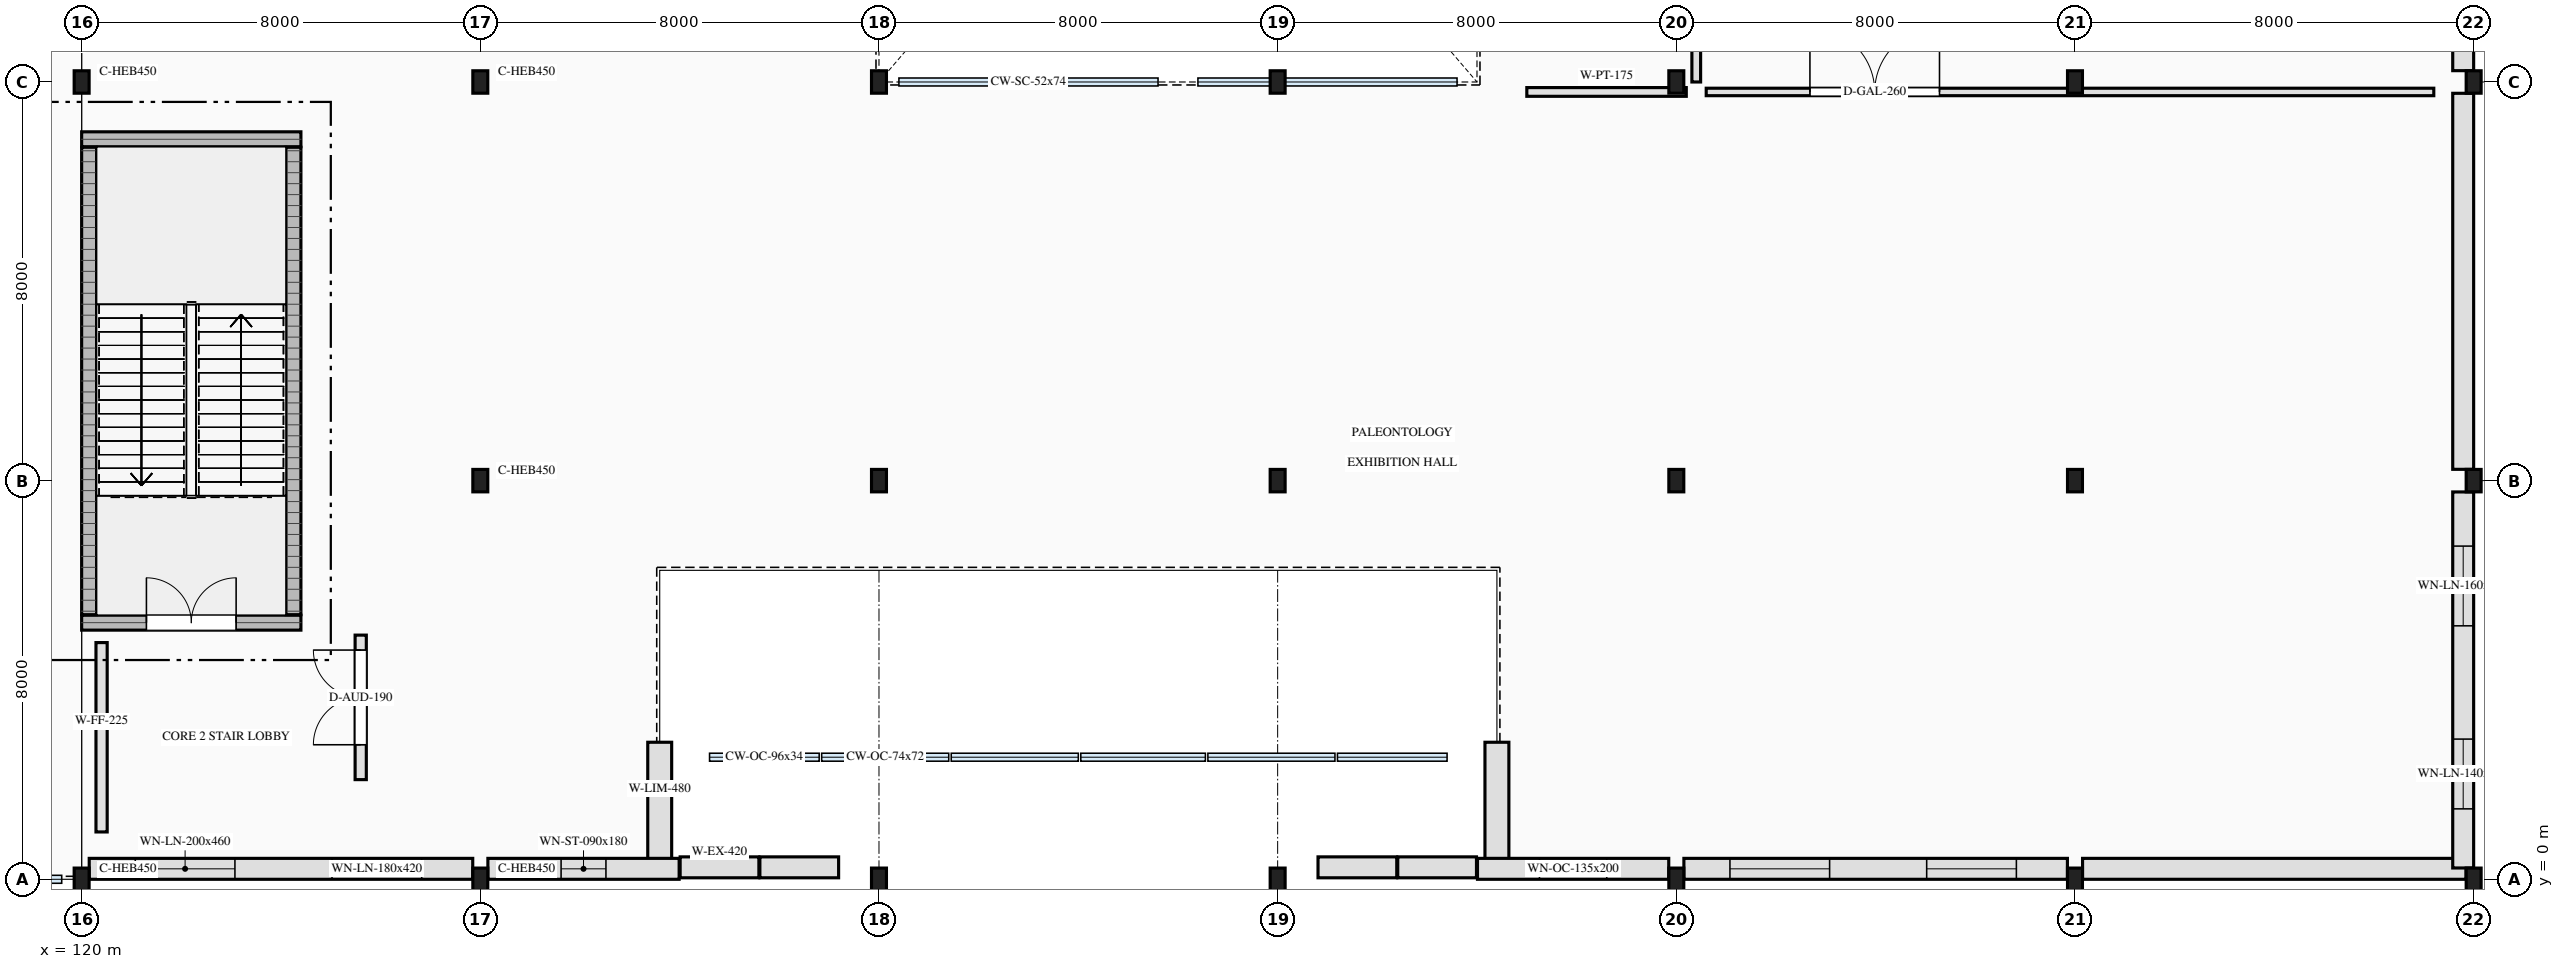
"""IFC4 building model, lengths in metres.
Left out: names, types, materials, properties, quantities, classifications, styles, units other than length and angle.
Written with IfcOpenShell. Run it as: python <this file> out.ifc"""

import sys

from ifc_helpers import new_model, si_unit, direction, frame, frame_2d, origin, origin_2d, place, context, subcontext, project, spatial, rectangle, i_section, extrude, element, fill, save


model = new_model("IFC4")
c1 = context("Model", 3, precision=1e-05, world=origin(), true_north=direction((0.0, 1.0)))
c2 = subcontext(c1, "Body", "Model", "MODEL_VIEW")
j1 = project(units=[si_unit("LENGTHUNIT", "METRE"), si_unit("PLANEANGLEUNIT", "RADIAN")], contexts=[c1])
p1 = place(None, origin())
s1 = spatial("IfcSite", under=j1, at=p1, CompositionType="ELEMENT")
p2 = place(p1, origin())
s2 = spatial("IfcBuilding", under=s1, at=p2, CompositionType="ELEMENT")
p3 = place(p2, frame((0.0, 0.0, 9.6)))
s3 = spatial("IfcBuildingStorey", under=s2, at=p3, CompositionType="ELEMENT", Elevation=9.6)
p4 = place(p3, frame((120.0, 5.15, 0.0), z_axis=(0.0, 0.0, 1.0), x_axis=(1.0, 0.0, 0.0)))
e1 = element("IfcWall", 1, at=p4, inside=s3, PredefinedType="SHEAR", context=c2, shape_type="SweptSolid", body=[
    extrude(rectangle(XDim=4.4, YDim=0.3, at=frame_2d((2.2, 0.0))), origin(), (0.0, 0.0, 1.0), 8.0),
])
p5 = place(p4, frame((1.3, 0.0, 0.0)))
e2 = element("IfcOpeningElement", 2, at=p5, cuts=e1, PredefinedType="OPENING", context=c2, shape_type="SweptSolid", body=[
    extrude(rectangle(XDim=1.8, YDim=2.2, at=frame_2d((0.9, 1.1))), frame((0.0, 0.16, 0.0), z_axis=(0.0, -1.0, 0.0), x_axis=(1.0, 0.0, 0.0)), (0.0, 0.0, 1.0), 0.32),
])
p6 = place(p3, frame((120.0, 14.85, 0.0), z_axis=(0.0, 0.0, 1.0), x_axis=(1.0, 0.0, 0.0)))
e3 = element("IfcWall", 3, at=p6, inside=s3, PredefinedType="SHEAR", context=c2, shape_type="SweptSolid", body=[
    extrude(rectangle(XDim=4.4, YDim=0.3, at=frame_2d((2.2, 0.0))), origin(), (0.0, 0.0, 1.0), 8.0),
])
for number, where, z_axis, x_axis in (
    (4, (120.15, 5.31, 0.0), (0.0, 0.0, 1.0), (0.0, 1.0, 0.0)),
    (5, (124.25, 5.31, 0.0), (0.0, 0.0, 1.0), (0.0, 1.0, 0.0)),
):
    element("IfcWall", number, at=place(p3, frame(where, z_axis=z_axis, x_axis=x_axis)), inside=s3, PredefinedType="SHEAR", context=c2, shape_type="SweptSolid", body=[
        extrude(rectangle(XDim=9.38, YDim=0.3, at=frame_2d((4.69, 0.0))), origin(), (0.0, 0.0, 1.0), 8.0),
    ])
for number, where, z_axis, x_axis in (
    (6, (120.0, 0.0, 0.0), (0.0, 0.0, 1.0), (1.0, 0.0, 0.0)),
    (7, (120.0, 16.0, 0.0), (0.0, 0.0, 1.0), (1.0, 0.0, 0.0)),
    (8, (128.0, 0.0, 0.0), (0.0, 0.0, 1.0), (1.0, 0.0, 0.0)),
    (9, (128.0, 8.0, 0.0), (0.0, 0.0, 1.0), (1.0, 0.0, 0.0)),
    (10, (128.0, 16.0, 0.0), (0.0, 0.0, 1.0), (1.0, 0.0, 0.0)),
    (11, (136.0, 0.0, 0.0), (0.0, 0.0, 1.0), (1.0, 0.0, 0.0)),
    (12, (136.0, 8.0, 0.0), (0.0, 0.0, 1.0), (1.0, 0.0, 0.0)),
    (13, (136.0, 16.0, 0.0), (0.0, 0.0, 1.0), (1.0, 0.0, 0.0)),
    (14, (144.0, 0.0, 0.0), (0.0, 0.0, 1.0), (1.0, 0.0, 0.0)),
    (15, (144.0, 8.0, 0.0), (0.0, 0.0, 1.0), (1.0, 0.0, 0.0)),
    (16, (144.0, 16.0, 0.0), (0.0, 0.0, 1.0), (1.0, 0.0, 0.0)),
    (17, (152.0, 0.0, 0.0), (0.0, 0.0, 1.0), (1.0, 0.0, 0.0)),
    (18, (152.0, 8.0, 0.0), (0.0, 0.0, 1.0), (1.0, 0.0, 0.0)),
    (19, (152.0, 16.0, 0.0), (0.0, 0.0, 1.0), (1.0, 0.0, 0.0)),
    (20, (160.0, 0.0, 0.0), (0.0, 0.0, 1.0), (1.0, 0.0, 0.0)),
    (21, (160.0, 8.0, 0.0), (0.0, 0.0, 1.0), (1.0, 0.0, 0.0)),
    (22, (160.0, 16.0, 0.0), (0.0, 0.0, 1.0), (1.0, 0.0, 0.0)),
    (23, (168.0, 0.0, 0.0), (0.0, 0.0, 1.0), (1.0, 0.0, 0.0)),
    (24, (168.0, 8.0, 0.0), (0.0, 0.0, 1.0), (1.0, 0.0, 0.0)),
    (25, (168.0, 16.0, 0.0), (0.0, 0.0, 1.0), (1.0, 0.0, 0.0)),
):
    element("IfcColumn", number, at=place(p3, frame(where, z_axis=z_axis, x_axis=x_axis)), inside=s3, PredefinedType="COLUMN", context=c2, shape_type="SweptSolid", body=[
        extrude(i_section(OverallWidth=0.3, OverallDepth=0.45, WebThickness=0.014, FlangeThickness=0.026, FilletRadius=0.027, at=origin_2d()), origin(), (0.0, 0.0, 1.0), 8.0),
    ])
p7 = place(p3, frame((133.59, 0.24, 0.0), z_axis=(0.0, 0.0, 1.0), x_axis=(-1.0, 0.0, 0.0)))
e26 = element("IfcWall", 26, at=p7, inside=s3, PredefinedType="SOLIDWALL", context=c2, shape_type="SweptSolid", body=[
    extrude(rectangle(XDim=1.58, YDim=0.42, at=frame_2d((0.79, 0.0))), origin(), (0.0, 0.0, 1.0), 2.772),
])
for number, where, z_axis, x_axis in (
    (27, (135.19, 0.24, 0.0), (0.0, 0.0, 1.0), (-1.0, 0.0, 0.0)),
    (28, (146.39, 0.24, 0.0), (0.0, 0.0, 1.0), (-1.0, 0.0, 0.0)),
):
    element("IfcWall", number, at=place(p3, frame(where, z_axis=z_axis, x_axis=x_axis)), inside=s3, PredefinedType="SOLIDWALL", context=c2, shape_type="SweptSolid", body=[
        extrude(rectangle(XDim=1.58, YDim=0.42, at=frame_2d((0.79, 0.0))), origin(), (0.0, 0.0, 1.0), 0.399),
    ])
p8 = place(p3, frame((147.99, 0.24, 0.0), z_axis=(0.0, 0.0, 1.0), x_axis=(-1.0, 0.0, 0.0)))
e29 = element("IfcWall", 29, at=p8, inside=s3, PredefinedType="SOLIDWALL", context=c2, shape_type="SweptSolid", body=[
    extrude(rectangle(XDim=1.58, YDim=0.42, at=frame_2d((0.79, 0.0))), origin(), (0.0, 0.0, 1.0), 2.772),
])
for number, where, z_axis, x_axis in (
    (30, (131.6, 0.24, 0.0), (0.0, 0.0, 1.0), (0.0, 1.0, 0.0)),
    (31, (148.4, 0.24, 0.0), (0.0, 0.0, 1.0), (0.0, 1.0, 0.0)),
):
    element("IfcWall", number, at=place(p3, frame(where, z_axis=z_axis, x_axis=x_axis)), inside=s3, PredefinedType="SOLIDWALL", context=c2, shape_type="SweptSolid", body=[
        extrude(rectangle(XDim=2.51, YDim=0.48, at=frame_2d((1.255, 0.0))), origin(), (0.0, 0.0, 1.0), 7.72),
    ])
p9 = place(p3, frame((127.848, 0.21, 0.0), z_axis=(0.0, 0.0, 1.0), x_axis=(-1.0, 0.0, 0.0)))
e32 = element("IfcWall", 32, at=p9, inside=s3, PredefinedType="SOLIDWALL", context=c2, shape_type="SweptSolid", body=[
    extrude(rectangle(XDim=7.696, YDim=0.42, at=frame_2d((3.848, 0.0))), origin(), (0.0, 0.0, 1.0), 7.285),
])
p10 = place(p9, frame((1.024, 0.0, 0.85)))
e33 = element("IfcOpeningElement", 33, at=p10, cuts=e32, PredefinedType="OPENING", context=c2, shape_type="SweptSolid", body=[
    extrude(rectangle(XDim=1.8, YDim=4.2, at=frame_2d((0.9, 2.1))), frame((0.0, 0.22, 0.0), z_axis=(0.0, -1.0, 0.0), x_axis=(1.0, 0.0, 0.0)), (0.0, 0.0, 1.0), 0.44),
])
p11 = place(p9, frame((4.772, 0.0, 0.85)))
e34 = element("IfcOpeningElement", 34, at=p11, cuts=e32, PredefinedType="OPENING", context=c2, shape_type="SweptSolid", body=[
    extrude(rectangle(XDim=2.0, YDim=4.6, at=frame_2d((1.0, 2.3))), frame((0.0, 0.22, 0.0), z_axis=(0.0, -1.0, 0.0), x_axis=(1.0, 0.0, 0.0)), (0.0, 0.0, 1.0), 0.44),
])
p12 = place(p3, frame((131.99, 0.21, 0.0), z_axis=(0.0, 0.0, 1.0), x_axis=(-1.0, 0.0, 0.0)))
e35 = element("IfcWall", 35, at=p12, inside=s3, PredefinedType="SOLIDWALL", context=c2, shape_type="SweptSolid", body=[
    extrude(rectangle(XDim=3.838, YDim=0.42, at=frame_2d((1.919, 0.0))), origin(), (0.0, 0.0, 1.0), 7.76),
])
p13 = place(p12, frame((1.469, 0.0, 0.85)))
e36 = element("IfcOpeningElement", 36, at=p13, cuts=e35, PredefinedType="OPENING", context=c2, shape_type="SweptSolid", body=[
    extrude(rectangle(XDim=0.9, YDim=1.8, at=frame_2d((0.45, 0.9))), frame((0.0, 0.22, 0.0), z_axis=(0.0, -1.0, 0.0), x_axis=(1.0, 0.0, 0.0)), (0.0, 0.0, 1.0), 0.44),
])
p14 = place(p3, frame((159.848, 0.21, 0.0), z_axis=(0.0, 0.0, 1.0), x_axis=(-1.0, 0.0, 0.0)))
e37 = element("IfcWall", 37, at=p14, inside=s3, PredefinedType="SOLIDWALL", context=c2, shape_type="SweptSolid", body=[
    extrude(rectangle(XDim=7.696, YDim=0.42, at=frame_2d((3.848, 0.0))), origin(), (0.0, 0.0, 1.0), 7.305),
])
p15 = place(p14, frame((1.024, 0.0, 0.85)))
e38 = element("IfcOpeningElement", 38, at=p15, cuts=e37, PredefinedType="OPENING", context=c2, shape_type="SweptSolid", body=[
    extrude(rectangle(XDim=1.8, YDim=4.2, at=frame_2d((0.9, 2.1))), frame((0.0, 0.22, 0.0), z_axis=(0.0, -1.0, 0.0), x_axis=(1.0, 0.0, 0.0)), (0.0, 0.0, 1.0), 0.44),
])
p16 = place(p14, frame((4.772, 0.0, 0.85)))
e39 = element("IfcOpeningElement", 39, at=p16, cuts=e37, PredefinedType="OPENING", context=c2, shape_type="SweptSolid", body=[
    extrude(rectangle(XDim=2.0, YDim=4.6, at=frame_2d((1.0, 2.3))), frame((0.0, 0.22, 0.0), z_axis=(0.0, -1.0, 0.0), x_axis=(1.0, 0.0, 0.0)), (0.0, 0.0, 1.0), 0.44),
])
p17 = place(p3, frame((167.848, 0.21, 0.0), z_axis=(0.0, 0.0, 1.0), x_axis=(-1.0, 0.0, 0.0)))
e40 = element("IfcWall", 40, at=p17, inside=s3, PredefinedType="SOLIDWALL", context=c2, shape_type="SweptSolid", body=[
    extrude(rectangle(XDim=7.696, YDim=0.42, at=frame_2d((3.848, 0.0))), origin(), (0.0, 0.0, 1.0), 7.305),
])
p18 = place(p3, frame((151.848, 0.21, 0.0), z_axis=(0.0, 0.0, 1.0), x_axis=(-1.0, 0.0, 0.0)))
e41 = element("IfcWall", 41, at=p18, inside=s3, PredefinedType="SOLIDWALL", context=c2, shape_type="SweptSolid", body=[
    extrude(rectangle(XDim=3.838, YDim=0.42, at=frame_2d((1.919, 0.0))), origin(), (0.0, 0.0, 1.0), 7.76),
])
p19 = place(p18, frame((1.244, 0.0, 0.85)))
e42 = element("IfcOpeningElement", 42, at=p19, cuts=e41, PredefinedType="OPENING", context=c2, shape_type="SweptSolid", body=[
    extrude(rectangle(XDim=1.35, YDim=2.0, at=frame_2d((0.675, 1.0))), frame((0.0, 0.22, 0.0), z_axis=(0.0, -1.0, 0.0), x_axis=(1.0, 0.0, 0.0)), (0.0, 0.0, 1.0), 0.44),
])
p20 = place(p3, frame((167.79, 7.773, 0.0), z_axis=(0.0, 0.0, 1.0), x_axis=(0.0, -1.0, 0.0)))
e43 = element("IfcWall", 43, at=p20, inside=s3, PredefinedType="SOLIDWALL", context=c2, shape_type="SweptSolid", body=[
    extrude(rectangle(XDim=7.546, YDim=0.42, at=frame_2d((3.773, 0.0))), origin(), (0.0, 0.0, 1.0), 7.305),
])
p21 = place(p20, frame((1.086, 0.0, 0.85)))
e44 = element("IfcOpeningElement", 44, at=p21, cuts=e43, PredefinedType="OPENING", context=c2, shape_type="SweptSolid", body=[
    extrude(rectangle(XDim=1.6, YDim=3.6, at=frame_2d((0.8, 1.8))), frame((0.0, 0.22, 0.0), z_axis=(0.0, -1.0, 0.0), x_axis=(1.0, 0.0, 0.0)), (0.0, 0.0, 1.0), 0.44),
])
p22 = place(p20, frame((4.959, 0.0, 0.85)))
e45 = element("IfcOpeningElement", 45, at=p22, cuts=e43, PredefinedType="OPENING", context=c2, shape_type="SweptSolid", body=[
    extrude(rectangle(XDim=1.4, YDim=3.4, at=frame_2d((0.7, 1.7))), frame((0.0, 0.22, 0.0), z_axis=(0.0, -1.0, 0.0), x_axis=(1.0, 0.0, 0.0)), (0.0, 0.0, 1.0), 0.44),
])
p23 = place(p3, frame((167.79, 15.773, 0.0), z_axis=(0.0, 0.0, 1.0), x_axis=(0.0, -1.0, 0.0)))
e46 = element("IfcWall", 46, at=p23, inside=s3, PredefinedType="SOLIDWALL", context=c2, shape_type="SweptSolid", body=[
    extrude(rectangle(XDim=7.546, YDim=0.42, at=frame_2d((3.773, 0.0))), origin(), (0.0, 0.0, 1.0), 7.305),
])
p24 = place(p3, frame((167.79, 23.773, 0.0), z_axis=(0.0, 0.0, 1.0), x_axis=(0.0, -1.0, 0.0)))
e47 = element("IfcWall", 47, at=p24, inside=s3, PredefinedType="SOLIDWALL", context=c2, shape_type="SweptSolid", body=[
    extrude(rectangle(XDim=7.546, YDim=0.42, at=frame_2d((3.773, 0.0))), origin(), (0.0, 0.0, 1.0), 7.305),
])
p25 = place(p24, frame((1.086, 0.0, 0.85)))
e48 = element("IfcOpeningElement", 48, at=p25, cuts=e47, PredefinedType="OPENING", context=c2, shape_type="SweptSolid", body=[
    extrude(rectangle(XDim=1.6, YDim=3.6, at=frame_2d((0.8, 1.8))), frame((0.0, 0.22, 0.0), z_axis=(0.0, -1.0, 0.0), x_axis=(1.0, 0.0, 0.0)), (0.0, 0.0, 1.0), 0.44),
])
p26 = place(p24, frame((4.959, 0.0, 0.85)))
e49 = element("IfcOpeningElement", 49, at=p26, cuts=e47, PredefinedType="OPENING", context=c2, shape_type="SweptSolid", body=[
    extrude(rectangle(XDim=1.4, YDim=3.4, at=frame_2d((0.7, 1.7))), frame((0.0, 0.22, 0.0), z_axis=(0.0, -1.0, 0.0), x_axis=(1.0, 0.0, 0.0)), (0.0, 0.0, 1.0), 0.44),
])
p27 = place(p3, frame((125.6, 2.0, 0.0), z_axis=(0.0, 0.0, 1.0), x_axis=(0.0, 1.0, 0.0)))
e50 = element("IfcWall", 50, at=p27, inside=s3, PredefinedType="SOLIDWALL", context=c2, shape_type="SweptSolid", body=[
    extrude(rectangle(XDim=2.9, YDim=0.225, at=frame_2d((1.45, 0.0))), origin(), (0.0, 0.0, 1.0), 7.76),
])
p28 = place(p27, frame((0.7, 0.0, 0.0)))
e51 = element("IfcOpeningElement", 51, at=p28, cuts=e50, PredefinedType="OPENING", context=c2, shape_type="SweptSolid", body=[
    extrude(rectangle(XDim=1.9, YDim=2.35, at=frame_2d((0.95, 1.175))), frame((0.0, 0.123, 0.0), z_axis=(0.0, -1.0, 0.0), x_axis=(1.0, 0.0, 0.0)), (0.0, 0.0, 1.0), 0.245),
])
p29 = place(p3, frame((149.0, 15.8, 0.0), z_axis=(0.0, 0.0, 1.0), x_axis=(1.0, 0.0, 0.0)))
e52 = element("IfcWall", 52, at=p29, inside=s3, PredefinedType="PARTITIONING", context=c2, shape_type="SweptSolid", body=[
    extrude(rectangle(XDim=3.2, YDim=0.175, at=frame_2d((1.6, 0.0))), origin(), (0.0, 0.0, 1.0), 7.37),
])
p30 = place(p3, frame((152.4, 16.0, 0.0), z_axis=(0.0, 0.0, 1.0), x_axis=(0.0, 1.0, 0.0)))
e53 = element("IfcWall", 53, at=p30, inside=s3, PredefinedType="PARTITIONING", context=c2, shape_type="SweptSolid", body=[
    extrude(rectangle(XDim=16.6, YDim=0.175, at=frame_2d((8.3, 0.0))), origin(), (0.0, 0.0, 1.0), 7.76),
])
p31 = place(p30, frame((3.12, 0.0, 0.0)))
e54 = element("IfcOpeningElement", 54, at=p31, cuts=e53, PredefinedType="OPENING", context=c2, shape_type="SweptSolid", body=[
    extrude(rectangle(XDim=1.9, YDim=2.35, at=frame_2d((0.95, 1.175))), frame((0.0, 0.097, 0.0), z_axis=(0.0, -1.0, 0.0), x_axis=(1.0, 0.0, 0.0)), (0.0, 0.0, 1.0), 0.195),
])
p32 = place(p3, frame((152.6, 15.8, 0.0), z_axis=(0.0, 0.0, 1.0), x_axis=(1.0, 0.0, 0.0)))
e55 = element("IfcWall", 55, at=p32, inside=s3, PredefinedType="PARTITIONING", context=c2, shape_type="SweptSolid", body=[
    extrude(rectangle(XDim=14.6, YDim=0.15, at=frame_2d((7.3, 0.0))), origin(), (0.0, 0.0, 1.0), 7.37),
])
p33 = place(p32, frame((2.081, 0.0, 0.0)))
e56 = element("IfcOpeningElement", 56, at=p33, cuts=e55, PredefinedType="OPENING", context=c2, shape_type="SweptSolid", body=[
    extrude(rectangle(XDim=2.6, YDim=2.9, at=frame_2d((1.3, 1.45))), frame((0.0, 0.085, 0.0), z_axis=(0.0, -1.0, 0.0), x_axis=(1.0, 0.0, 0.0)), (0.0, 0.0, 1.0), 0.17),
])
p34 = place(p3, frame((120.4, 0.95, 0.0), z_axis=(0.0, 0.0, 1.0), x_axis=(0.0, 1.0, 0.0)))
e57 = element("IfcWall", 57, at=p34, inside=s3, PredefinedType="SOLIDWALL", context=c2, shape_type="SweptSolid", body=[
    extrude(rectangle(XDim=3.8, YDim=0.225, at=frame_2d((1.9, 0.0))), origin(), (0.0, 0.0, 1.0), 7.76),
])
p35 = place(p10, origin())
e58 = element("IfcWindow", 58, at=p35, inside=s3, PartitioningType="DOUBLE_PANEL_VERTICAL", PredefinedType="WINDOW", context=c2, shape_type="SweptSolid", body=[
    extrude(rectangle(XDim=1.8, YDim=4.2, at=frame_2d((0.9, 2.1))), frame((0.0, 0.03, 0.0), z_axis=(0.0, -1.0, 0.0), x_axis=(1.0, 0.0, 0.0)), (0.0, 0.0, 1.0), 0.06),
])
fill(e33, e58)
p36 = place(p11, origin())
e59 = element("IfcWindow", 59, at=p36, inside=s3, PartitioningType="TRIPLE_PANEL_VERTICAL", PredefinedType="WINDOW", context=c2, shape_type="SweptSolid", body=[
    extrude(rectangle(XDim=2.0, YDim=4.6, at=frame_2d((1.0, 2.3))), frame((0.0, 0.03, 0.0), z_axis=(0.0, -1.0, 0.0), x_axis=(1.0, 0.0, 0.0)), (0.0, 0.0, 1.0), 0.06),
])
fill(e34, e59)
p37 = place(p13, origin())
e60 = element("IfcWindow", 60, at=p37, inside=s3, PartitioningType="SINGLE_PANEL", PredefinedType="WINDOW", context=c2, shape_type="SweptSolid", body=[
    extrude(rectangle(XDim=0.9, YDim=1.8, at=frame_2d((0.45, 0.9))), frame((0.0, 0.03, 0.0), z_axis=(0.0, -1.0, 0.0), x_axis=(1.0, 0.0, 0.0)), (0.0, 0.0, 1.0), 0.06),
])
fill(e36, e60)
p38 = place(p15, origin())
e61 = element("IfcWindow", 61, at=p38, inside=s3, PartitioningType="DOUBLE_PANEL_VERTICAL", PredefinedType="WINDOW", context=c2, shape_type="SweptSolid", body=[
    extrude(rectangle(XDim=1.8, YDim=4.2, at=frame_2d((0.9, 2.1))), frame((0.0, 0.03, 0.0), z_axis=(0.0, -1.0, 0.0), x_axis=(1.0, 0.0, 0.0)), (0.0, 0.0, 1.0), 0.06),
])
fill(e38, e61)
p39 = place(p16, origin())
e62 = element("IfcWindow", 62, at=p39, inside=s3, PartitioningType="TRIPLE_PANEL_VERTICAL", PredefinedType="WINDOW", context=c2, shape_type="SweptSolid", body=[
    extrude(rectangle(XDim=2.0, YDim=4.6, at=frame_2d((1.0, 2.3))), frame((0.0, 0.03, 0.0), z_axis=(0.0, -1.0, 0.0), x_axis=(1.0, 0.0, 0.0)), (0.0, 0.0, 1.0), 0.06),
])
fill(e39, e62)
p40 = place(p19, origin())
e63 = element("IfcWindow", 63, at=p40, inside=s3, PartitioningType="SINGLE_PANEL", PredefinedType="WINDOW", context=c2, shape_type="SweptSolid", body=[
    extrude(rectangle(XDim=1.35, YDim=2.0, at=frame_2d((0.675, 1.0))), frame((0.0, 0.03, 0.0), z_axis=(0.0, -1.0, 0.0), x_axis=(1.0, 0.0, 0.0)), (0.0, 0.0, 1.0), 0.06),
])
fill(e42, e63)
p41 = place(p21, origin())
e64 = element("IfcWindow", 64, at=p41, inside=s3, PartitioningType="DOUBLE_PANEL_VERTICAL", PredefinedType="WINDOW", context=c2, shape_type="SweptSolid", body=[
    extrude(rectangle(XDim=1.6, YDim=3.6, at=frame_2d((0.8, 1.8))), frame((0.0, 0.03, 0.0), z_axis=(0.0, -1.0, 0.0), x_axis=(1.0, 0.0, 0.0)), (0.0, 0.0, 1.0), 0.06),
])
fill(e44, e64)
p42 = place(p22, origin())
e65 = element("IfcWindow", 65, at=p42, inside=s3, PartitioningType="SINGLE_PANEL", PredefinedType="WINDOW", context=c2, shape_type="SweptSolid", body=[
    extrude(rectangle(XDim=1.4, YDim=3.4, at=frame_2d((0.7, 1.7))), frame((0.0, 0.03, 0.0), z_axis=(0.0, -1.0, 0.0), x_axis=(1.0, 0.0, 0.0)), (0.0, 0.0, 1.0), 0.06),
])
fill(e45, e65)
p43 = place(p5, origin())
e66 = element("IfcDoor", 66, at=p43, inside=s3, OperationType="DOUBLE_DOOR_SINGLE_SWING", PredefinedType="DOOR", context=c2, shape_type="SweptSolid", body=[
    extrude(rectangle(XDim=1.8, YDim=2.2, at=frame_2d((0.9, 1.1))), frame((0.0, 0.025, 0.0), z_axis=(0.0, -1.0, 0.0), x_axis=(1.0, 0.0, 0.0)), (0.0, 0.0, 1.0), 0.05),
])
fill(e2, e66)
p44 = place(p28, origin())
e67 = element("IfcDoor", 67, at=p44, inside=s3, OperationType="DOUBLE_DOOR_SINGLE_SWING", PredefinedType="DOOR", context=c2, shape_type="SweptSolid", body=[
    extrude(rectangle(XDim=1.9, YDim=2.35, at=frame_2d((0.95, 1.175))), frame((0.0, 0.025, 0.0), z_axis=(0.0, -1.0, 0.0), x_axis=(1.0, 0.0, 0.0)), (0.0, 0.0, 1.0), 0.05),
])
fill(e51, e67)
p45 = place(p33, origin())
e68 = element("IfcDoor", 68, at=p45, inside=s3, OperationType="DOUBLE_DOOR_DOUBLE_SWING", PredefinedType="DOOR", context=c2, shape_type="SweptSolid", body=[
    extrude(rectangle(XDim=2.6, YDim=2.9, at=frame_2d((1.3, 1.45))), frame((0.0, 0.025, 0.0), z_axis=(0.0, -1.0, 0.0), x_axis=(1.0, 0.0, 0.0)), (0.0, 0.0, 1.0), 0.05),
])
fill(e56, e68)
save(model, sys.argv[1])
